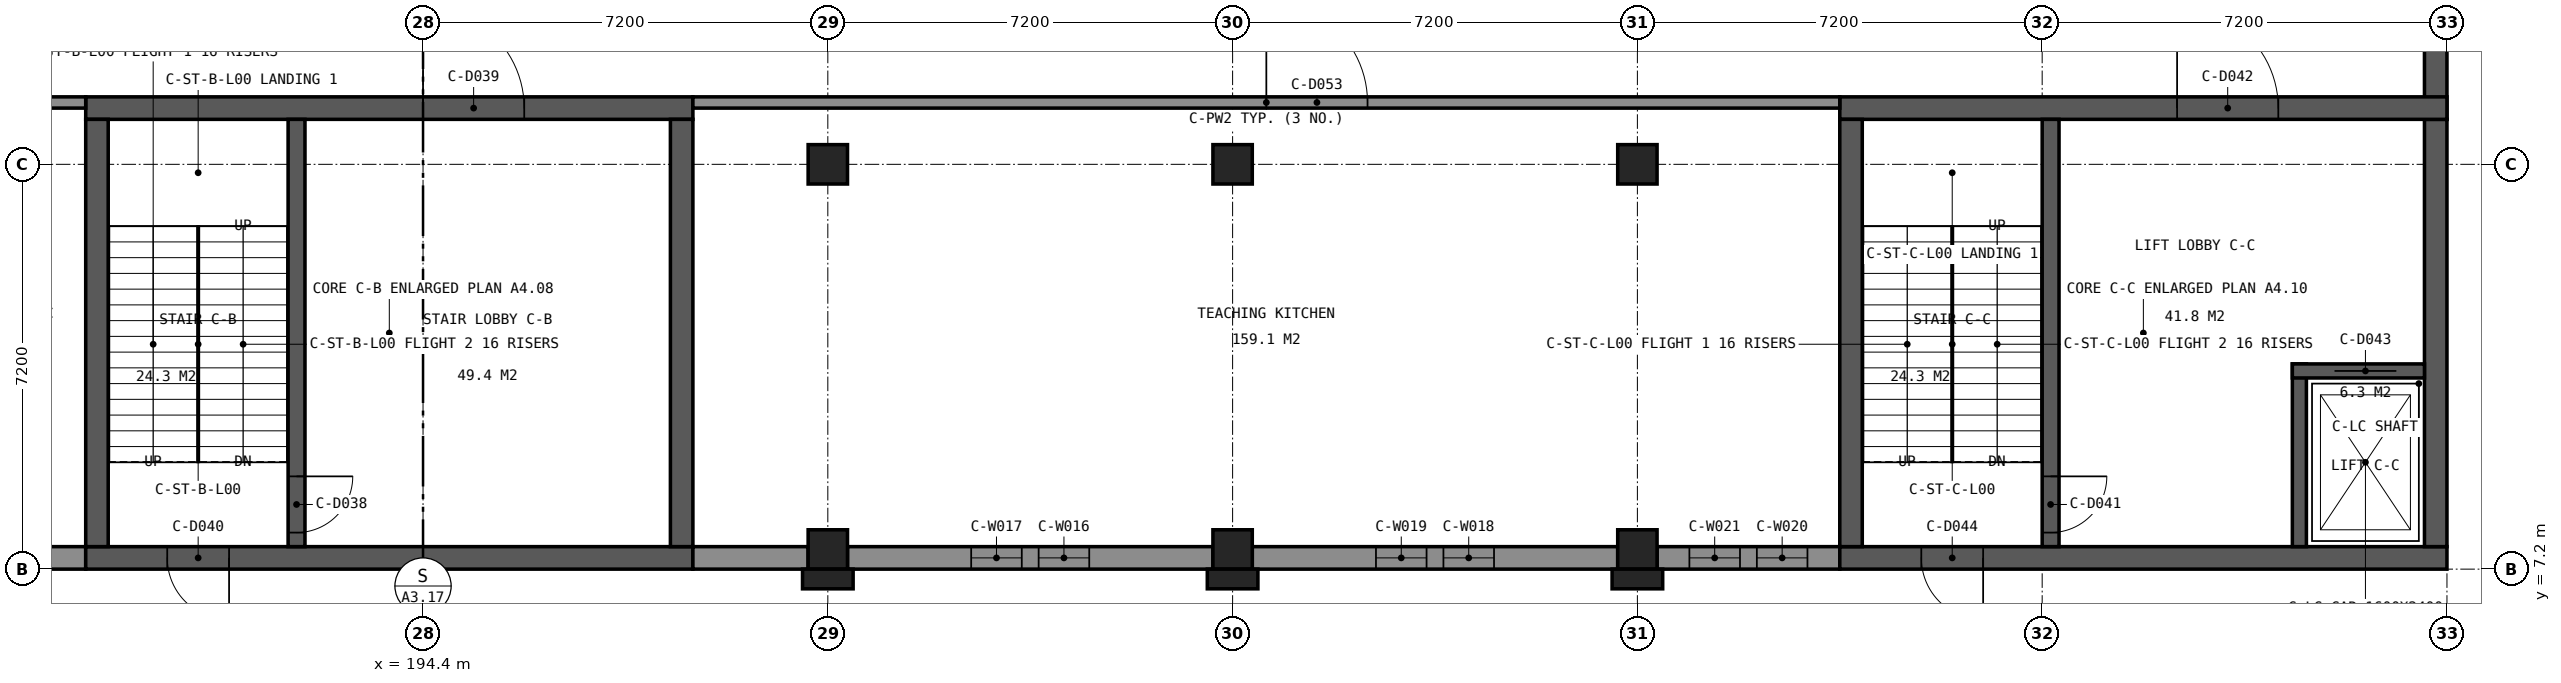
"""IFC4 building model, lengths in metres.
Left out: names, types, materials, properties, quantities, classifications, styles, units other than length and angle.
Written with IfcOpenShell. Run it as: python <this file> out.ifc"""

import sys

from ifc_helpers import new_model, si_unit, direction, frame, frame_2d, origin, origin_2d, place, context, subcontext, project, spatial, rectangle, extrude, element, fill, save


model = new_model("IFC4")
c1 = context("Model", 3, precision=1e-05, world=origin(), true_north=direction((0.0, 1.0)))
c2 = subcontext(c1, "Body", "Model", "MODEL_VIEW")
j1 = project(units=[si_unit("LENGTHUNIT", "METRE"), si_unit("PLANEANGLEUNIT", "RADIAN")], contexts=[c1])
p1 = place(None, origin())
s1 = spatial("IfcSite", under=j1, at=p1, CompositionType="ELEMENT")
p2 = place(p1, origin())
s2 = spatial("IfcBuilding", under=s1, at=p2, CompositionType="ELEMENT")
p3 = place(p2, frame((0.0, 0.0, 4.8)))
s3 = spatial("IfcBuildingStorey", under=s2, at=p3, CompositionType="ELEMENT", Elevation=4.8)
for number, where, z_axis, x_axis in (
    (1, (201.6, 14.4, 0.0), (0.0, 0.0, 1.0), (1.0, 0.0, 0.0)),
    (2, (208.8, 14.4, 0.0), (0.0, 0.0, 1.0), (1.0, 0.0, 0.0)),
    (3, (216.0, 14.4, 0.0), (0.0, 0.0, 1.0), (1.0, 0.0, 0.0)),
    (4, (201.6, 7.55, 0.0), (0.0, 0.0, 1.0), (1.0, 0.0, 0.0)),
    (5, (208.8, 7.55, 0.0), (0.0, 0.0, 1.0), (1.0, 0.0, 0.0)),
    (6, (216.0, 7.55, 0.0), (0.0, 0.0, 1.0), (1.0, 0.0, 0.0)),
):
    element("IfcColumn", number, at=place(p3, frame(where, z_axis=z_axis, x_axis=x_axis)), inside=s3, PredefinedType="COLUMN", context=c2, shape_type="SweptSolid", body=[
        extrude(rectangle(XDim=0.7, YDim=0.7, at=origin_2d()), origin(), (0.0, 0.0, 1.0), 4.8),
    ])
p4 = place(p3, frame((188.4, 7.4, 0.0), z_axis=(0.0, 0.0, 1.0), x_axis=(-1.0, 0.0, 0.0)))
e7 = element("IfcWall", 7, at=p4, inside=s3, PredefinedType="SOLIDWALL", context=c2, shape_type="SweptSolid", body=[
    extrude(rectangle(XDim=0.85, YDim=0.4, at=frame_2d((0.425, 0.0))), origin(), (0.0, 0.0, 1.0), 3.95),
])
p5 = place(p3, frame((199.2, 7.4, 0.0), z_axis=(0.0, 0.0, 1.0), x_axis=(-1.0, 0.0, 0.0)))
e8 = element("IfcWall", 8, at=p5, inside=s3, PredefinedType="SHEAR", context=c2, shape_type="SweptSolid", body=[
    extrude(rectangle(XDim=10.8, YDim=0.4, at=frame_2d((5.4, 0.0))), origin(), (0.0, 0.0, 1.0), 4.55),
])
p6 = place(p5, frame((8.25, 0.0, 0.0)))
e9 = element("IfcOpeningElement", 9, at=p6, cuts=e8, PredefinedType="OPENING", context=c2, shape_type="SweptSolid", body=[
    extrude(rectangle(XDim=1.1, YDim=2.1, at=frame_2d((0.55, 1.05))), frame((0.0, 0.21, 0.0), z_axis=(0.0, -1.0, 0.0), x_axis=(1.0, 0.0, 0.0)), (0.0, 0.0, 1.0), 0.42),
])
p7 = place(p3, frame((201.25, 7.4, 0.0), z_axis=(0.0, 0.0, 1.0), x_axis=(-1.0, 0.0, 0.0)))
e10 = element("IfcWall", 10, at=p7, inside=s3, PredefinedType="SOLIDWALL", context=c2, shape_type="SweptSolid", body=[
    extrude(rectangle(XDim=2.05, YDim=0.4, at=frame_2d((1.025, 0.0))), origin(), (0.0, 0.0, 1.0), 3.95),
])
p8 = place(p3, frame((208.45, 7.4, 0.0), z_axis=(0.0, 0.0, 1.0), x_axis=(-1.0, 0.0, 0.0)))
e11 = element("IfcWall", 11, at=p8, inside=s3, PredefinedType="SOLIDWALL", context=c2, shape_type="SweptSolid", body=[
    extrude(rectangle(XDim=6.5, YDim=0.4, at=frame_2d((3.25, 0.0))), origin(), (0.0, 0.0, 1.0), 3.95),
])
p9 = place(p8, frame((2.2, 0.0, 1.0)))
e12 = element("IfcOpeningElement", 12, at=p9, cuts=e11, PredefinedType="OPENING", context=c2, shape_type="SweptSolid", body=[
    extrude(rectangle(XDim=0.9, YDim=2.1, at=frame_2d((0.45, 1.05))), frame((0.0, 0.21, 0.0), z_axis=(0.0, -1.0, 0.0), x_axis=(1.0, 0.0, 0.0)), (0.0, 0.0, 1.0), 0.42),
])
p10 = place(p8, frame((3.4, 0.0, 1.0)))
e13 = element("IfcOpeningElement", 13, at=p10, cuts=e11, PredefinedType="OPENING", context=c2, shape_type="SweptSolid", body=[
    extrude(rectangle(XDim=0.9, YDim=2.1, at=frame_2d((0.45, 1.05))), frame((0.0, 0.21, 0.0), z_axis=(0.0, -1.0, 0.0), x_axis=(1.0, 0.0, 0.0)), (0.0, 0.0, 1.0), 0.42),
])
p11 = place(p3, frame((215.65, 7.4, 0.0), z_axis=(0.0, 0.0, 1.0), x_axis=(-1.0, 0.0, 0.0)))
e14 = element("IfcWall", 14, at=p11, inside=s3, PredefinedType="SOLIDWALL", context=c2, shape_type="SweptSolid", body=[
    extrude(rectangle(XDim=6.5, YDim=0.4, at=frame_2d((3.25, 0.0))), origin(), (0.0, 0.0, 1.0), 3.95),
])
p12 = place(p11, frame((2.2, 0.0, 1.0)))
e15 = element("IfcOpeningElement", 15, at=p12, cuts=e14, PredefinedType="OPENING", context=c2, shape_type="SweptSolid", body=[
    extrude(rectangle(XDim=0.9, YDim=2.1, at=frame_2d((0.45, 1.05))), frame((0.0, 0.21, 0.0), z_axis=(0.0, -1.0, 0.0), x_axis=(1.0, 0.0, 0.0)), (0.0, 0.0, 1.0), 0.42),
])
p13 = place(p11, frame((3.4, 0.0, 1.0)))
e16 = element("IfcOpeningElement", 16, at=p13, cuts=e14, PredefinedType="OPENING", context=c2, shape_type="SweptSolid", body=[
    extrude(rectangle(XDim=0.9, YDim=2.1, at=frame_2d((0.45, 1.05))), frame((0.0, 0.21, 0.0), z_axis=(0.0, -1.0, 0.0), x_axis=(1.0, 0.0, 0.0)), (0.0, 0.0, 1.0), 0.42),
])
p14 = place(p3, frame((219.6, 7.4, 0.0), z_axis=(0.0, 0.0, 1.0), x_axis=(-1.0, 0.0, 0.0)))
e17 = element("IfcWall", 17, at=p14, inside=s3, PredefinedType="SOLIDWALL", context=c2, shape_type="SweptSolid", body=[
    extrude(rectangle(XDim=3.25, YDim=0.4, at=frame_2d((1.625, 0.0))), origin(), (0.0, 0.0, 1.0), 3.95),
])
p15 = place(p14, frame((0.575, 0.0, 1.0)))
e18 = element("IfcOpeningElement", 18, at=p15, cuts=e17, PredefinedType="OPENING", context=c2, shape_type="SweptSolid", body=[
    extrude(rectangle(XDim=0.9, YDim=2.1, at=frame_2d((0.45, 1.05))), frame((0.0, 0.21, 0.0), z_axis=(0.0, -1.0, 0.0), x_axis=(1.0, 0.0, 0.0)), (0.0, 0.0, 1.0), 0.42),
])
p16 = place(p14, frame((1.775, 0.0, 1.0)))
e19 = element("IfcOpeningElement", 19, at=p16, cuts=e17, PredefinedType="OPENING", context=c2, shape_type="SweptSolid", body=[
    extrude(rectangle(XDim=0.9, YDim=2.1, at=frame_2d((0.45, 1.05))), frame((0.0, 0.21, 0.0), z_axis=(0.0, -1.0, 0.0), x_axis=(1.0, 0.0, 0.0)), (0.0, 0.0, 1.0), 0.42),
])
p17 = place(p3, frame((230.4, 7.4, 0.0), z_axis=(0.0, 0.0, 1.0), x_axis=(-1.0, 0.0, 0.0)))
e20 = element("IfcWall", 20, at=p17, inside=s3, PredefinedType="SHEAR", context=c2, shape_type="SweptSolid", body=[
    extrude(rectangle(XDim=10.8, YDim=0.4, at=frame_2d((5.4, 0.0))), origin(), (0.0, 0.0, 1.0), 4.55),
])
p18 = place(p17, frame((8.25, 0.0, 0.0)))
e21 = element("IfcOpeningElement", 21, at=p18, cuts=e20, PredefinedType="OPENING", context=c2, shape_type="SweptSolid", body=[
    extrude(rectangle(XDim=1.1, YDim=2.1, at=frame_2d((0.55, 1.05))), frame((0.0, 0.21, 0.0), z_axis=(0.0, -1.0, 0.0), x_axis=(1.0, 0.0, 0.0)), (0.0, 0.0, 1.0), 0.42),
])
p19 = place(p3, frame((230.2, 21.25, 0.0), z_axis=(0.0, 0.0, 1.0), x_axis=(0.0, -1.0, 0.0)))
e22 = element("IfcWall", 22, at=p19, inside=s3, PredefinedType="SHEAR", context=c2, shape_type="SweptSolid", body=[
    extrude(rectangle(XDim=6.05, YDim=0.4, at=frame_2d((3.025, 0.0))), origin(), (0.0, 0.0, 1.0), 3.95),
])
p20 = place(p19, frame((3.6, 0.0, 0.0)))
e23 = element("IfcOpeningElement", 23, at=p20, cuts=e22, PredefinedType="OPENING", context=c2, shape_type="SweptSolid", body=[
    extrude(rectangle(XDim=1.1, YDim=2.1, at=frame_2d((0.55, 1.05))), frame((0.0, 0.21, 0.0), z_axis=(0.0, -1.0, 0.0), x_axis=(1.0, 0.0, 0.0)), (0.0, 0.0, 1.0), 0.42),
])
p21 = place(p19, frame((0.639, 0.0, 1.0)))
e24 = element("IfcOpeningElement", 24, at=p21, cuts=e22, PredefinedType="OPENING", context=c2, shape_type="SweptSolid", body=[
    extrude(rectangle(XDim=0.9, YDim=2.1, at=frame_2d((0.45, 1.05))), frame((0.0, 0.21, 0.0), z_axis=(0.0, -1.0, 0.0), x_axis=(1.0, 0.0, 0.0)), (0.0, 0.0, 1.0), 0.42),
])
p22 = place(p3, frame((230.2, 15.2, 0.0), z_axis=(0.0, 0.0, 1.0), x_axis=(0.0, -1.0, 0.0)))
e25 = element("IfcWall", 25, at=p22, inside=s3, PredefinedType="SHEAR", context=c2, shape_type="SweptSolid", body=[
    extrude(rectangle(XDim=7.6, YDim=0.4, at=frame_2d((3.8, 0.0))), origin(), (0.0, 0.0, 1.0), 4.55),
])
p23 = place(p3, frame((188.4, 15.4, 0.0), z_axis=(0.0, 0.0, 1.0), x_axis=(1.0, 0.0, 0.0)))
e26 = element("IfcWall", 26, at=p23, inside=s3, PredefinedType="SHEAR", context=c2, shape_type="SweptSolid", body=[
    extrude(rectangle(XDim=10.8, YDim=0.4, at=frame_2d((5.4, 0.0))), origin(), (0.0, 0.0, 1.0), 4.55),
])
p24 = place(p23, frame((6.0, 0.0, 0.0)))
e27 = element("IfcOpeningElement", 27, at=p24, cuts=e26, PredefinedType="OPENING", context=c2, shape_type="SweptSolid", body=[
    extrude(rectangle(XDim=1.8, YDim=2.1, at=frame_2d((0.9, 1.05))), frame((0.0, 0.21, 0.0), z_axis=(0.0, -1.0, 0.0), x_axis=(1.0, 0.0, 0.0)), (0.0, 0.0, 1.0), 0.42),
])
for number, where, z_axis, x_axis in (
    (28, (188.6, 15.2, 0.0), (0.0, 0.0, 1.0), (0.0, -1.0, 0.0)),
    (29, (199.0, 15.2, 0.0), (0.0, 0.0, 1.0), (0.0, -1.0, 0.0)),
):
    element("IfcWall", number, at=place(p3, frame(where, z_axis=z_axis, x_axis=x_axis)), inside=s3, PredefinedType="SHEAR", context=c2, shape_type="SweptSolid", body=[
        extrude(rectangle(XDim=7.6, YDim=0.4, at=frame_2d((3.8, 0.0))), origin(), (0.0, 0.0, 1.0), 4.55),
    ])
p25 = place(p3, frame((192.15, 15.2, 0.0), z_axis=(0.0, 0.0, 1.0), x_axis=(0.0, -1.0, 0.0)))
e30 = element("IfcWall", 30, at=p25, inside=s3, PredefinedType="SHEAR", context=c2, shape_type="SweptSolid", body=[
    extrude(rectangle(XDim=7.6, YDim=0.3, at=frame_2d((3.8, 0.0))), origin(), (0.0, 0.0, 1.0), 4.55),
])
p26 = place(p25, frame((6.35, 0.0, 0.0)))
e31 = element("IfcOpeningElement", 31, at=p26, cuts=e30, PredefinedType="OPENING", context=c2, shape_type="SweptSolid", body=[
    extrude(rectangle(XDim=1.0, YDim=2.1, at=frame_2d((0.5, 1.05))), frame((0.0, 0.16, 0.0), z_axis=(0.0, -1.0, 0.0), x_axis=(1.0, 0.0, 0.0)), (0.0, 0.0, 1.0), 0.32),
])
p27 = place(p3, frame((219.6, 15.4, 0.0), z_axis=(0.0, 0.0, 1.0), x_axis=(1.0, 0.0, 0.0)))
e32 = element("IfcWall", 32, at=p27, inside=s3, PredefinedType="SHEAR", context=c2, shape_type="SweptSolid", body=[
    extrude(rectangle(XDim=10.8, YDim=0.4, at=frame_2d((5.4, 0.0))), origin(), (0.0, 0.0, 1.0), 4.55),
])
p28 = place(p27, frame((6.0, 0.0, 0.0)))
e33 = element("IfcOpeningElement", 33, at=p28, cuts=e32, PredefinedType="OPENING", context=c2, shape_type="SweptSolid", body=[
    extrude(rectangle(XDim=1.8, YDim=2.1, at=frame_2d((0.9, 1.05))), frame((0.0, 0.21, 0.0), z_axis=(0.0, -1.0, 0.0), x_axis=(1.0, 0.0, 0.0)), (0.0, 0.0, 1.0), 0.42),
])
p29 = place(p3, frame((219.8, 15.2, 0.0), z_axis=(0.0, 0.0, 1.0), x_axis=(0.0, -1.0, 0.0)))
e34 = element("IfcWall", 34, at=p29, inside=s3, PredefinedType="SHEAR", context=c2, shape_type="SweptSolid", body=[
    extrude(rectangle(XDim=7.6, YDim=0.4, at=frame_2d((3.8, 0.0))), origin(), (0.0, 0.0, 1.0), 4.55),
])
p30 = place(p3, frame((223.35, 15.2, 0.0), z_axis=(0.0, 0.0, 1.0), x_axis=(0.0, -1.0, 0.0)))
e35 = element("IfcWall", 35, at=p30, inside=s3, PredefinedType="SHEAR", context=c2, shape_type="SweptSolid", body=[
    extrude(rectangle(XDim=7.6, YDim=0.3, at=frame_2d((3.8, 0.0))), origin(), (0.0, 0.0, 1.0), 4.55),
])
p31 = place(p30, frame((6.35, 0.0, 0.0)))
e36 = element("IfcOpeningElement", 36, at=p31, cuts=e35, PredefinedType="OPENING", context=c2, shape_type="SweptSolid", body=[
    extrude(rectangle(XDim=1.0, YDim=2.1, at=frame_2d((0.5, 1.05))), frame((0.0, 0.16, 0.0), z_axis=(0.0, -1.0, 0.0), x_axis=(1.0, 0.0, 0.0)), (0.0, 0.0, 1.0), 0.32),
])
p32 = place(p3, frame((227.775, 10.85, 0.0), z_axis=(0.0, 0.0, 1.0), x_axis=(0.0, -1.0, 0.0)))
e37 = element("IfcWall", 37, at=p32, inside=s3, PredefinedType="SHEAR", context=c2, shape_type="SweptSolid", body=[
    extrude(rectangle(XDim=3.25, YDim=0.25, at=frame_2d((1.625, 0.0))), origin(), (0.0, 0.0, 1.0), 4.55),
])
p33 = place(p3, frame((227.65, 10.725, 0.0), z_axis=(0.0, 0.0, 1.0), x_axis=(1.0, 0.0, 0.0)))
e38 = element("IfcWall", 38, at=p33, inside=s3, PredefinedType="SHEAR", context=c2, shape_type="SweptSolid", body=[
    extrude(rectangle(XDim=2.35, YDim=0.25, at=frame_2d((1.175, 0.0))), origin(), (0.0, 0.0, 1.0), 4.55),
])
p34 = place(p33, frame((0.75, 0.0, 0.0)))
e39 = element("IfcOpeningElement", 39, at=p34, cuts=e38, PredefinedType="OPENING", context=c2, shape_type="SweptSolid", body=[
    extrude(rectangle(XDim=1.1, YDim=2.1, at=frame_2d((0.55, 1.05))), frame((0.0, 0.135, 0.0), z_axis=(0.0, -1.0, 0.0), x_axis=(1.0, 0.0, 0.0)), (0.0, 0.0, 1.0), 0.27),
])
for number, where, z_axis, x_axis in (
    (40, (201.6, 7.025, 0.0), (0.0, 0.0, 1.0), (1.0, 0.0, 0.0)),
    (41, (208.8, 7.025, 0.0), (0.0, 0.0, 1.0), (1.0, 0.0, 0.0)),
    (42, (216.0, 7.025, 0.0), (0.0, 0.0, 1.0), (1.0, 0.0, 0.0)),
):
    element("IfcColumn", number, at=place(p3, frame(where, z_axis=z_axis, x_axis=x_axis)), inside=s3, PredefinedType="PILASTER", context=c2, shape_type="SweptSolid", body=[
        extrude(rectangle(XDim=0.9, YDim=0.35, at=origin_2d()), origin(), (0.0, 0.0, 1.0), 4.8),
    ])
p35 = place(p3, frame((185.2, 15.5, 0.0), z_axis=(0.0, 0.0, 1.0), x_axis=(1.0, 0.0, 0.0)))
e43 = element("IfcWall", 43, at=p35, inside=s3, PredefinedType="PARTITIONING", context=c2, shape_type="SweptSolid", body=[
    extrude(rectangle(XDim=3.2, YDim=0.2, at=frame_2d((1.6, 0.0))), origin(), (0.0, 0.0, 1.0), 3.95),
])
p36 = place(p35, frame((0.5, 0.0, 0.0)))
e44 = element("IfcOpeningElement", 44, at=p36, cuts=e43, PredefinedType="OPENING", context=c2, shape_type="SweptSolid", body=[
    extrude(rectangle(XDim=1.0, YDim=2.1, at=frame_2d((0.5, 1.05))), frame((0.0, 0.11, 0.0), z_axis=(0.0, -1.0, 0.0), x_axis=(1.0, 0.0, 0.0)), (0.0, 0.0, 1.0), 0.22),
])
p37 = place(p3, frame((199.2, 15.5, 0.0), z_axis=(0.0, 0.0, 1.0), x_axis=(1.0, 0.0, 0.0)))
e45 = element("IfcWall", 45, at=p37, inside=s3, PredefinedType="PARTITIONING", context=c2, shape_type="SweptSolid", body=[
    extrude(rectangle(XDim=20.4, YDim=0.2, at=frame_2d((10.2, 0.0))), origin(), (0.0, 0.0, 1.0), 3.95),
])
p38 = place(p37, frame((10.2, 0.0, 0.0)))
e46 = element("IfcOpeningElement", 46, at=p38, cuts=e45, PredefinedType="OPENING", context=c2, shape_type="SweptSolid", body=[
    extrude(rectangle(XDim=1.8, YDim=2.1, at=frame_2d((0.9, 1.05))), frame((0.0, 0.11, 0.0), z_axis=(0.0, -1.0, 0.0), x_axis=(1.0, 0.0, 0.0)), (0.0, 0.0, 1.0), 0.22),
])
p39 = place(p9, origin())
e47 = element("IfcWindow", 47, at=p39, inside=s3, PartitioningType="SINGLE_PANEL", PredefinedType="WINDOW", context=c2, shape_type="SweptSolid", body=[
    extrude(rectangle(XDim=0.9, YDim=2.1, at=frame_2d((0.45, 1.05))), frame((0.0, -0.09, 0.0), z_axis=(0.0, -1.0, 0.0), x_axis=(1.0, 0.0, 0.0)), (0.0, 0.0, 1.0), 0.06),
])
fill(e12, e47)
p40 = place(p10, origin())
e48 = element("IfcWindow", 48, at=p40, inside=s3, PartitioningType="SINGLE_PANEL", PredefinedType="WINDOW", context=c2, shape_type="SweptSolid", body=[
    extrude(rectangle(XDim=0.9, YDim=2.1, at=frame_2d((0.45, 1.05))), frame((0.0, -0.09, 0.0), z_axis=(0.0, -1.0, 0.0), x_axis=(1.0, 0.0, 0.0)), (0.0, 0.0, 1.0), 0.06),
])
fill(e13, e48)
p41 = place(p12, origin())
e49 = element("IfcWindow", 49, at=p41, inside=s3, PartitioningType="SINGLE_PANEL", PredefinedType="WINDOW", context=c2, shape_type="SweptSolid", body=[
    extrude(rectangle(XDim=0.9, YDim=2.1, at=frame_2d((0.45, 1.05))), frame((0.0, -0.09, 0.0), z_axis=(0.0, -1.0, 0.0), x_axis=(1.0, 0.0, 0.0)), (0.0, 0.0, 1.0), 0.06),
])
fill(e15, e49)
p42 = place(p13, origin())
e50 = element("IfcWindow", 50, at=p42, inside=s3, PartitioningType="SINGLE_PANEL", PredefinedType="WINDOW", context=c2, shape_type="SweptSolid", body=[
    extrude(rectangle(XDim=0.9, YDim=2.1, at=frame_2d((0.45, 1.05))), frame((0.0, -0.09, 0.0), z_axis=(0.0, -1.0, 0.0), x_axis=(1.0, 0.0, 0.0)), (0.0, 0.0, 1.0), 0.06),
])
fill(e16, e50)
p43 = place(p15, origin())
e51 = element("IfcWindow", 51, at=p43, inside=s3, PartitioningType="SINGLE_PANEL", PredefinedType="WINDOW", context=c2, shape_type="SweptSolid", body=[
    extrude(rectangle(XDim=0.9, YDim=2.1, at=frame_2d((0.45, 1.05))), frame((0.0, -0.09, 0.0), z_axis=(0.0, -1.0, 0.0), x_axis=(1.0, 0.0, 0.0)), (0.0, 0.0, 1.0), 0.06),
])
fill(e18, e51)
p44 = place(p16, origin())
e52 = element("IfcWindow", 52, at=p44, inside=s3, PartitioningType="SINGLE_PANEL", PredefinedType="WINDOW", context=c2, shape_type="SweptSolid", body=[
    extrude(rectangle(XDim=0.9, YDim=2.1, at=frame_2d((0.45, 1.05))), frame((0.0, -0.09, 0.0), z_axis=(0.0, -1.0, 0.0), x_axis=(1.0, 0.0, 0.0)), (0.0, 0.0, 1.0), 0.06),
])
fill(e19, e52)
p45 = place(p26, origin())
e53 = element("IfcDoor", 53, at=p45, inside=s3, OperationType="NOTDEFINED", PredefinedType="DOOR", context=c2, shape_type="SweptSolid", body=[
    extrude(rectangle(XDim=1.0, YDim=2.1, at=frame_2d((0.5, 1.05))), frame((0.0, 0.025, 0.0), z_axis=(0.0, -1.0, 0.0), x_axis=(1.0, 0.0, 0.0)), (0.0, 0.0, 1.0), 0.05),
])
fill(e31, e53)
p46 = place(p24, origin())
e54 = element("IfcDoor", 54, at=p46, inside=s3, OperationType="NOTDEFINED", PredefinedType="DOOR", context=c2, shape_type="SweptSolid", body=[
    extrude(rectangle(XDim=1.8, YDim=2.1, at=frame_2d((0.9, 1.05))), frame((0.0, 0.025, 0.0), z_axis=(0.0, -1.0, 0.0), x_axis=(1.0, 0.0, 0.0)), (0.0, 0.0, 1.0), 0.05),
])
fill(e27, e54)
p47 = place(p6, origin())
e55 = element("IfcDoor", 55, at=p47, inside=s3, OperationType="NOTDEFINED", PredefinedType="DOOR", context=c2, shape_type="SweptSolid", body=[
    extrude(rectangle(XDim=1.1, YDim=2.1, at=frame_2d((0.55, 1.05))), frame((0.0, 0.025, 0.0), z_axis=(0.0, -1.0, 0.0), x_axis=(1.0, 0.0, 0.0)), (0.0, 0.0, 1.0), 0.05),
])
fill(e9, e55)
p48 = place(p31, origin())
e56 = element("IfcDoor", 56, at=p48, inside=s3, OperationType="NOTDEFINED", PredefinedType="DOOR", context=c2, shape_type="SweptSolid", body=[
    extrude(rectangle(XDim=1.0, YDim=2.1, at=frame_2d((0.5, 1.05))), frame((0.0, 0.025, 0.0), z_axis=(0.0, -1.0, 0.0), x_axis=(1.0, 0.0, 0.0)), (0.0, 0.0, 1.0), 0.05),
])
fill(e36, e56)
p49 = place(p28, origin())
e57 = element("IfcDoor", 57, at=p49, inside=s3, OperationType="NOTDEFINED", PredefinedType="DOOR", context=c2, shape_type="SweptSolid", body=[
    extrude(rectangle(XDim=1.8, YDim=2.1, at=frame_2d((0.9, 1.05))), frame((0.0, 0.025, 0.0), z_axis=(0.0, -1.0, 0.0), x_axis=(1.0, 0.0, 0.0)), (0.0, 0.0, 1.0), 0.05),
])
fill(e33, e57)
p50 = place(p34, origin())
e58 = element("IfcDoor", 58, at=p50, inside=s3, OperationType="SLIDING_TO_LEFT", PredefinedType="DOOR", context=c2, shape_type="SweptSolid", body=[
    extrude(rectangle(XDim=1.1, YDim=2.1, at=frame_2d((0.55, 1.05))), frame((0.0, 0.025, 0.0), z_axis=(0.0, -1.0, 0.0), x_axis=(1.0, 0.0, 0.0)), (0.0, 0.0, 1.0), 0.05),
])
fill(e39, e58)
p51 = place(p18, origin())
e59 = element("IfcDoor", 59, at=p51, inside=s3, OperationType="NOTDEFINED", PredefinedType="DOOR", context=c2, shape_type="SweptSolid", body=[
    extrude(rectangle(XDim=1.1, YDim=2.1, at=frame_2d((0.55, 1.05))), frame((0.0, 0.025, 0.0), z_axis=(0.0, -1.0, 0.0), x_axis=(1.0, 0.0, 0.0)), (0.0, 0.0, 1.0), 0.05),
])
fill(e21, e59)
p52 = place(p38, origin())
e60 = element("IfcDoor", 60, at=p52, inside=s3, OperationType="NOTDEFINED", PredefinedType="DOOR", context=c2, shape_type="SweptSolid", body=[
    extrude(rectangle(XDim=1.8, YDim=2.1, at=frame_2d((0.9, 1.05))), frame((0.0, 0.025, 0.0), z_axis=(0.0, -1.0, 0.0), x_axis=(1.0, 0.0, 0.0)), (0.0, 0.0, 1.0), 0.05),
])
fill(e46, e60)
save(model, sys.argv[1])
